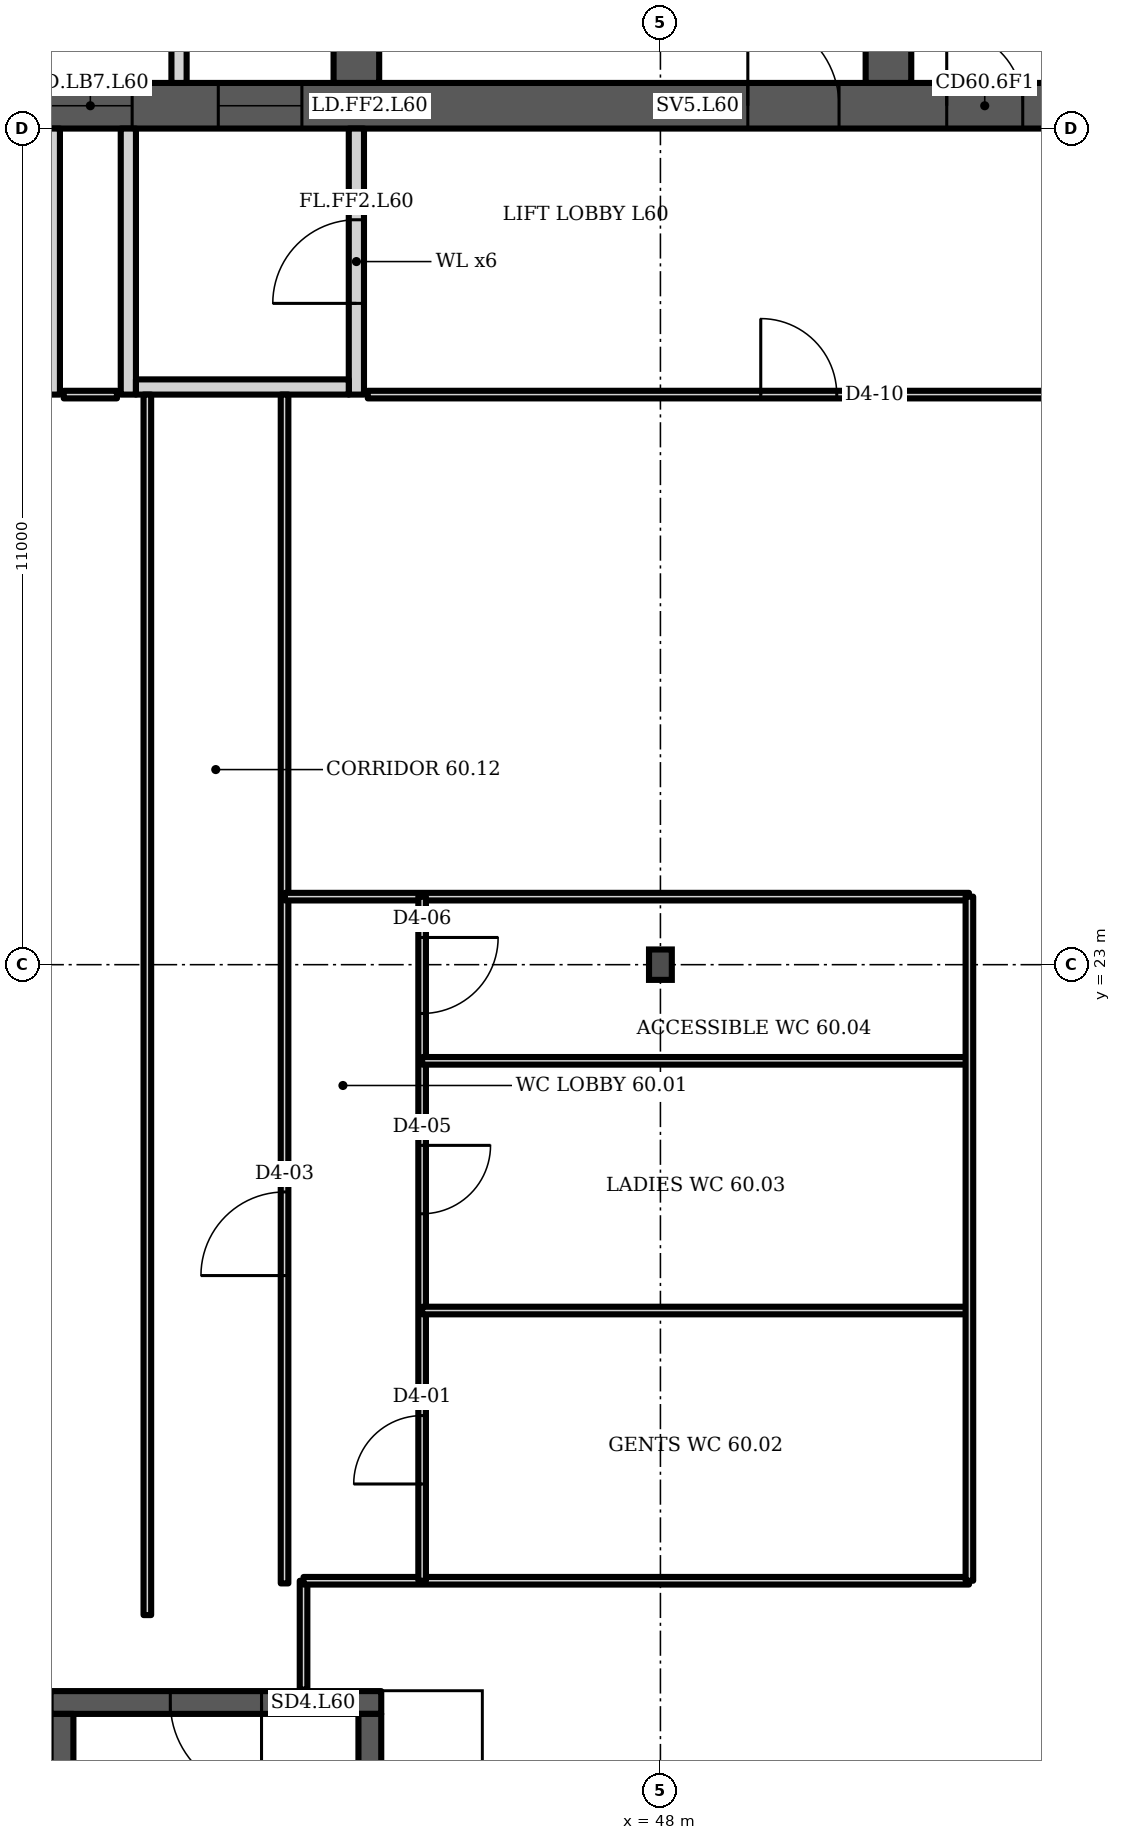
"""IFC4 building model, lengths in metres.
Left out: names, types, materials, properties, quantities, classifications, styles, units other than length and angle.
Written with IfcOpenShell. Run it as: python <this file> out.ifc"""

import sys

from ifc_helpers import new_model, si_unit, direction, frame, frame_2d, origin, origin_2d, place, context, subcontext, project, spatial, polyline, rectangle, i_section, outline, extrude, element, fill, save


model = new_model("IFC4")
c1 = context("Model", 3, precision=1e-05, world=origin(), true_north=direction((0.0, 1.0)))
c2 = subcontext(c1, "Body", "Model", "MODEL_VIEW")
j1 = project(units=[si_unit("LENGTHUNIT", "METRE"), si_unit("PLANEANGLEUNIT", "RADIAN")], contexts=[c1])
p1 = place(None, origin())
s1 = spatial("IfcSite", under=j1, at=p1, CompositionType="ELEMENT")
p2 = place(p1, origin())
s2 = spatial("IfcBuilding", under=s1, at=p2, CompositionType="ELEMENT")
p3 = place(p2, frame((0.0, 0.0, 239.5)))
s3 = spatial("IfcBuildingStorey", under=s2, at=p3, CompositionType="ELEMENT", Elevation=239.5)
p4 = place(p3, frame((23.0, 34.3, 0.0), z_axis=(0.0, 0.0, 1.0), x_axis=(1.0, 0.0, 0.0)))
e1 = element("IfcWall", 1, at=p4, inside=s3, PredefinedType="SHEAR", context=c2, shape_type="SweptSolid", body=[
    extrude(rectangle(XDim=35.0, YDim=0.6, at=frame_2d((17.5, 0.0))), origin(), (0.0, 0.0, 1.0), 3.6),
])
p5 = place(p4, frame((0.65, 0.0, 0.0)))
e2 = element("IfcOpeningElement", 2, at=p5, cuts=e1, PredefinedType="OPENING", context=c2, shape_type="SweptSolid", body=[
    extrude(rectangle(XDim=1.2, YDim=2.1, at=frame_2d((0.6, 1.05))), frame((0.0, 0.31, 0.0), z_axis=(0.0, -1.0, 0.0), x_axis=(1.0, 0.0, 0.0)), (0.0, 0.0, 1.0), 0.62),
])
p6 = place(p4, frame((7.717, 0.0, 0.0)))
e3 = element("IfcOpeningElement", 3, at=p6, cuts=e1, PredefinedType="OPENING", context=c2, shape_type="SweptSolid", body=[
    extrude(rectangle(XDim=1.1, YDim=2.1, at=frame_2d((0.55, 1.05))), frame((0.0, 0.31, 0.0), z_axis=(0.0, -1.0, 0.0), x_axis=(1.0, 0.0, 0.0)), (0.0, 0.0, 1.0), 0.62),
])
p7 = place(p4, frame((12.183, 0.0, 0.0)))
e4 = element("IfcOpeningElement", 4, at=p7, cuts=e1, PredefinedType="OPENING", context=c2, shape_type="SweptSolid", body=[
    extrude(rectangle(XDim=1.1, YDim=2.1, at=frame_2d((0.55, 1.05))), frame((0.0, 0.31, 0.0), z_axis=(0.0, -1.0, 0.0), x_axis=(1.0, 0.0, 0.0)), (0.0, 0.0, 1.0), 0.62),
])
p8 = place(p4, frame((9.8, 0.0, 0.0)))
e5 = element("IfcOpeningElement", 5, at=p8, cuts=e1, PredefinedType="OPENING", context=c2, shape_type="SweptSolid", body=[
    extrude(rectangle(XDim=1.4, YDim=2.1, at=frame_2d((0.7, 1.05))), frame((0.0, 0.31, 0.0), z_axis=(0.0, -1.0, 0.0), x_axis=(1.0, 0.0, 0.0)), (0.0, 0.0, 1.0), 0.62),
])
p9 = place(p4, frame((14.717, 0.0, 0.0)))
e6 = element("IfcOpeningElement", 6, at=p9, cuts=e1, PredefinedType="OPENING", context=c2, shape_type="SweptSolid", body=[
    extrude(rectangle(XDim=1.1, YDim=2.1, at=frame_2d((0.55, 1.05))), frame((0.0, 0.31, 0.0), z_axis=(0.0, -1.0, 0.0), x_axis=(1.0, 0.0, 0.0)), (0.0, 0.0, 1.0), 0.62),
])
p10 = place(p4, frame((16.95, 0.0, 0.0)))
e7 = element("IfcOpeningElement", 7, at=p10, cuts=e1, PredefinedType="OPENING", context=c2, shape_type="SweptSolid", body=[
    extrude(rectangle(XDim=1.1, YDim=2.1, at=frame_2d((0.55, 1.05))), frame((0.0, 0.31, 0.0), z_axis=(0.0, -1.0, 0.0), x_axis=(1.0, 0.0, 0.0)), (0.0, 0.0, 1.0), 0.62),
])
p11 = place(p4, frame((19.183, 0.0, 0.0)))
e8 = element("IfcOpeningElement", 8, at=p11, cuts=e1, PredefinedType="OPENING", context=c2, shape_type="SweptSolid", body=[
    extrude(rectangle(XDim=1.1, YDim=2.1, at=frame_2d((0.55, 1.05))), frame((0.0, 0.31, 0.0), z_axis=(0.0, -1.0, 0.0), x_axis=(1.0, 0.0, 0.0)), (0.0, 0.0, 1.0), 0.62),
])
p12 = place(p4, frame((26.15, 0.0, 0.0)))
e9 = element("IfcOpeningElement", 9, at=p12, cuts=e1, PredefinedType="OPENING", context=c2, shape_type="SweptSolid", body=[
    extrude(rectangle(XDim=1.2, YDim=2.1, at=frame_2d((0.6, 1.05))), frame((0.0, 0.31, 0.0), z_axis=(0.0, -1.0, 0.0), x_axis=(1.0, 0.0, 0.0)), (0.0, 0.0, 1.0), 0.62),
])
p13 = place(p4, frame((28.767, 0.0, 0.0)))
e10 = element("IfcOpeningElement", 10, at=p13, cuts=e1, PredefinedType="OPENING", context=c2, shape_type="SweptSolid", body=[
    extrude(rectangle(XDim=1.0, YDim=2.1, at=frame_2d((0.5, 1.05))), frame((0.0, 0.31, 0.0), z_axis=(0.0, -1.0, 0.0), x_axis=(1.0, 0.0, 0.0)), (0.0, 0.0, 1.0), 0.62),
])
p14 = place(p4, frame((33.083, 0.0, 0.0)))
e11 = element("IfcOpeningElement", 11, at=p14, cuts=e1, PredefinedType="OPENING", context=c2, shape_type="SweptSolid", body=[
    extrude(rectangle(XDim=1.0, YDim=2.1, at=frame_2d((0.5, 1.05))), frame((0.0, 0.31, 0.0), z_axis=(0.0, -1.0, 0.0), x_axis=(1.0, 0.0, 0.0)), (0.0, 0.0, 1.0), 0.62),
])
p15 = place(p4, frame((30.8, 0.0, 0.0)))
e12 = element("IfcOpeningElement", 12, at=p15, cuts=e1, PredefinedType="OPENING", context=c2, shape_type="SweptSolid", body=[
    extrude(rectangle(XDim=1.4, YDim=2.1, at=frame_2d((0.7, 1.05))), frame((0.0, 0.31, 0.0), z_axis=(0.0, -1.0, 0.0), x_axis=(1.0, 0.0, 0.0)), (0.0, 0.0, 1.0), 0.62),
])
p16 = place(p3, frame((44.0, 34.6, 0.0), z_axis=(0.0, 0.0, 1.0), x_axis=(0.0, 1.0, 0.0)))
e13 = element("IfcWall", 13, at=p16, inside=s3, PredefinedType="SHEAR", context=c2, shape_type="SweptSolid", body=[
    extrude(rectangle(XDim=14.784, YDim=0.6, at=frame_2d((7.392, 0.0))), origin(), (0.0, 0.0, 1.0), 3.6),
])
p17 = place(p16, frame((11.608, 0.0, 0.0)))
e14 = element("IfcOpeningElement", 14, at=p17, cuts=e13, PredefinedType="OPENING", context=c2, shape_type="SweptSolid", body=[
    extrude(rectangle(XDim=1.0, YDim=2.1, at=frame_2d((0.5, 1.05))), frame((0.0, 0.31, 0.0), z_axis=(0.0, -1.0, 0.0), x_axis=(1.0, 0.0, 0.0)), (0.0, 0.0, 1.0), 0.62),
])
p18 = place(p16, frame((3.8, 0.0, 0.0)))
e15 = element("IfcOpeningElement", 15, at=p18, cuts=e13, PredefinedType="OPENING", context=c2, shape_type="SweptSolid", body=[
    extrude(rectangle(XDim=1.1, YDim=2.1, at=frame_2d((0.55, 1.05))), frame((0.0, 0.31, 0.0), z_axis=(0.0, -1.0, 0.0), x_axis=(1.0, 0.0, 0.0)), (0.0, 0.0, 1.0), 0.62),
])
p19 = place(p3, frame((51.0, 34.6, 0.0), z_axis=(0.0, 0.0, 1.0), x_axis=(0.0, 1.0, 0.0)))
e16 = element("IfcWall", 16, at=p19, inside=s3, PredefinedType="SHEAR", context=c2, shape_type="SweptSolid", body=[
    extrude(rectangle(XDim=14.171, YDim=0.6, at=frame_2d((7.085, 0.0))), origin(), (0.0, 0.0, 1.0), 3.6),
])
p20 = place(p19, frame((3.8, 0.0, 0.0)))
e17 = element("IfcOpeningElement", 17, at=p20, cuts=e16, PredefinedType="OPENING", context=c2, shape_type="SweptSolid", body=[
    extrude(rectangle(XDim=1.1, YDim=2.1, at=frame_2d((0.55, 1.05))), frame((0.0, 0.31, 0.0), z_axis=(0.0, -1.0, 0.0), x_axis=(1.0, 0.0, 0.0)), (0.0, 0.0, 1.0), 0.62),
])
p21 = place(p3, frame((48.0, 23.0, 0.0), z_axis=(0.0, 0.0, 1.0), x_axis=(1.0, 0.0, 0.0)))
e18 = element("IfcColumn", 18, at=p21, inside=s3, PredefinedType="COLUMN", context=c2, shape_type="SweptSolid", body=[
    extrude(i_section(OverallWidth=0.3, OverallDepth=0.4, WebThickness=0.013, FlangeThickness=0.024, FilletRadius=0.027, at=origin_2d()), origin(), (0.0, 0.0, 1.0), 3.6),
])
p22 = place(p3, frame((0.0, 0.0, -0.0)))
e19 = element("IfcWall", 19, at=p22, inside=s3, PredefinedType="PARTITIONING", context=c2, shape_type="SweptSolid", body=[
    extrude(outline(polyline([(41.567, 37.1), (39.433, 37.1), (39.433, 34.6), (39.233, 34.6), (39.233, 37.45), (37.3, 37.45), (37.3, 37.65), (39.233, 37.65), (39.433, 37.65), (39.433, 37.3), (41.567, 37.3), (41.567, 37.35), (41.767, 37.35), (43.7, 37.35), (43.7, 37.15), (41.767, 37.15), (41.767, 34.6), (41.567, 34.6), (41.567, 37.1)])), origin(), (0.0, 0.0, 1.0), 3.2),
])
for number, where, z_axis, x_axis in (
    (20, (40.0, 30.5, 0.0), (0.0, 0.0, 1.0), (0.0, 1.0, 0.0)),
    (21, (41.0, 30.5, 0.0), (0.0, 0.0, 1.0), (0.0, 1.0, 0.0)),
):
    element("IfcWall", number, at=place(p3, frame(where, z_axis=z_axis, x_axis=x_axis)), inside=s3, PredefinedType="PARTITIONING", context=c2, shape_type="SweptSolid", body=[
        extrude(rectangle(XDim=3.5, YDim=0.2, at=frame_2d((1.75, 0.0))), origin(), (0.0, 0.0, 1.0), 3.2),
    ])
p23 = place(p3, frame((44.0, 30.5, 0.0), z_axis=(0.0, 0.0, 1.0), x_axis=(0.0, 1.0, 0.0)))
e22 = element("IfcWall", 22, at=p23, inside=s3, PredefinedType="PARTITIONING", context=c2, shape_type="SweptSolid", body=[
    extrude(rectangle(XDim=3.5, YDim=0.2, at=frame_2d((1.75, 0.0))), origin(), (0.0, 0.0, 1.0), 3.2),
])
p24 = place(p23, frame((1.2, 0.0, 0.0)))
e23 = element("IfcOpeningElement", 23, at=p24, cuts=e22, PredefinedType="OPENING", context=c2, shape_type="SweptSolid", body=[
    extrude(rectangle(XDim=1.1, YDim=2.1, at=frame_2d((0.55, 1.05))), frame((0.0, 0.11, 0.0), z_axis=(0.0, -1.0, 0.0), x_axis=(1.0, 0.0, 0.0)), (0.0, 0.0, 1.0), 0.22),
])
p25 = place(p3, frame((41.1, 30.6, 0.0), z_axis=(0.0, 0.0, 1.0), x_axis=(1.0, 0.0, 0.0)))
e24 = element("IfcWall", 24, at=p25, inside=s3, PredefinedType="PARTITIONING", context=c2, shape_type="SweptSolid", body=[
    extrude(rectangle(XDim=2.8, YDim=0.2, at=frame_2d((1.4, 0.0))), origin(), (0.0, 0.0, 1.0), 3.2),
])
p26 = place(p3, frame((39.977, 13.293, 0.0), z_axis=(0.0, 0.0, 1.0), x_axis=(1.0, 0.0, 0.0)))
e25 = element("IfcWall", 25, at=p26, inside=s3, PredefinedType="SHEAR", context=c2, shape_type="SweptSolid", body=[
    extrude(rectangle(XDim=4.35, YDim=0.3, at=frame_2d((2.175, 0.0))), origin(), (0.0, 0.0, 1.0), 3.2),
])
p27 = place(p26, frame((1.575, 0.0, 0.0)))
e26 = element("IfcOpeningElement", 26, at=p27, cuts=e25, PredefinedType="OPENING", context=c2, shape_type="SweptSolid", body=[
    extrude(rectangle(XDim=1.2, YDim=2.1, at=frame_2d((0.6, 1.05))), frame((0.0, 0.16, 0.0), z_axis=(0.0, -1.0, 0.0), x_axis=(1.0, 0.0, 0.0)), (0.0, 0.0, 1.0), 0.32),
])
p28 = place(p3, frame((41.25, 14.443, 0.0), z_axis=(0.0, 0.0, 1.0), x_axis=(0.0, 1.0, 0.0)))
e27 = element("IfcWall", 27, at=p28, inside=s3, PredefinedType="PARTITIONING", context=c2, shape_type="SweptSolid", body=[
    extrude(rectangle(XDim=16.057, YDim=0.1, at=frame_2d((8.028, 0.0))), origin(), (0.0, 0.0, 1.0), 3.2),
])
p29 = place(p3, frame((43.055, 14.86, 0.0), z_axis=(0.0, 0.0, 1.0), x_axis=(0.0, 1.0, 0.0)))
e28 = element("IfcWall", 28, at=p29, inside=s3, PredefinedType="PARTITIONING", context=c2, shape_type="SweptSolid", body=[
    extrude(rectangle(XDim=15.64, YDim=0.1, at=frame_2d((7.82, 0.0))), origin(), (0.0, 0.0, 1.0), 3.2),
])
p30 = place(p29, frame((4.05, 0.0, 0.0)))
e29 = element("IfcOpeningElement", 29, at=p30, cuts=e28, PredefinedType="OPENING", context=c2, shape_type="SweptSolid", body=[
    extrude(rectangle(XDim=1.1, YDim=2.1, at=frame_2d((0.55, 1.05))), frame((0.0, 0.06, 0.0), z_axis=(0.0, -1.0, 0.0), x_axis=(1.0, 0.0, 0.0)), (0.0, 0.0, 1.0), 0.12),
])
p31 = place(p3, frame((44.15, 30.5, 0.0), z_axis=(0.0, 0.0, 1.0), x_axis=(1.0, 0.0, 0.0)))
e30 = element("IfcWall", 30, at=p31, inside=s3, PredefinedType="PARTITIONING", context=c2, shape_type="SweptSolid", body=[
    extrude(rectangle(XDim=12.95, YDim=0.1, at=frame_2d((6.475, 0.0))), origin(), (0.0, 0.0, 1.0), 3.2),
])
p32 = place(p31, frame((5.17, 0.0, 0.0)))
e31 = element("IfcOpeningElement", 31, at=p32, cuts=e30, PredefinedType="OPENING", context=c2, shape_type="SweptSolid", body=[
    extrude(rectangle(XDim=1.0, YDim=2.1, at=frame_2d((0.5, 1.05))), frame((0.0, 0.06, 0.0), z_axis=(0.0, -1.0, 0.0), x_axis=(1.0, 0.0, 0.0)), (0.0, 0.0, 1.0), 0.12),
])
p33 = place(p3, frame((43.06, 23.895, 0.0), z_axis=(0.0, 0.0, 1.0), x_axis=(1.0, 0.0, 0.0)))
e32 = element("IfcWall", 32, at=p33, inside=s3, PredefinedType="PARTITIONING", context=c2, shape_type="SweptSolid", body=[
    extrude(rectangle(XDim=9.0, YDim=0.1, at=frame_2d((4.5, 0.0))), origin(), (0.0, 0.0, 1.0), 3.2),
])
p34 = place(p3, frame((43.305, 13.463, 0.0), z_axis=(0.0, 0.0, 1.0), x_axis=(0.0, 1.0, 0.0)))
e33 = element("IfcWall", 33, at=p34, inside=s3, PredefinedType="PARTITIONING", context=c2, shape_type="SweptSolid", body=[
    extrude(rectangle(XDim=1.432, YDim=0.1, at=frame_2d((0.716, 0.0))), origin(), (0.0, 0.0, 1.0), 3.2),
])
p35 = place(p3, frame((43.305, 14.895, 0.0), z_axis=(0.0, 0.0, 1.0), x_axis=(1.0, 0.0, 0.0)))
e34 = element("IfcWall", 34, at=p35, inside=s3, PredefinedType="PARTITIONING", context=c2, shape_type="SweptSolid", body=[
    extrude(rectangle(XDim=8.755, YDim=0.1, at=frame_2d((4.377, 0.0))), origin(), (0.0, 0.0, 1.0), 3.2),
])
p36 = place(p3, frame((44.865, 14.895, 0.0), z_axis=(0.0, 0.0, 1.0), x_axis=(0.0, 1.0, 0.0)))
e35 = element("IfcWall", 35, at=p36, inside=s3, PredefinedType="PARTITIONING", context=c2, shape_type="SweptSolid", body=[
    extrude(rectangle(XDim=9.0, YDim=0.1, at=frame_2d((4.5, 0.0))), origin(), (0.0, 0.0, 1.0), 3.2),
])
p37 = place(p36, frame((1.273, 0.0, 0.0)))
e36 = element("IfcOpeningElement", 36, at=p37, cuts=e35, PredefinedType="OPENING", context=c2, shape_type="SweptSolid", body=[
    extrude(rectangle(XDim=0.9, YDim=2.1, at=frame_2d((0.45, 1.05))), frame((0.0, 0.06, 0.0), z_axis=(0.0, -1.0, 0.0), x_axis=(1.0, 0.0, 0.0)), (0.0, 0.0, 1.0), 0.12),
])
p38 = place(p36, frame((4.828, 0.0, 0.0)))
e37 = element("IfcOpeningElement", 37, at=p38, cuts=e35, PredefinedType="OPENING", context=c2, shape_type="SweptSolid", body=[
    extrude(rectangle(XDim=0.9, YDim=2.1, at=frame_2d((0.45, 1.05))), frame((0.0, 0.06, 0.0), z_axis=(0.0, -1.0, 0.0), x_axis=(1.0, 0.0, 0.0)), (0.0, 0.0, 1.0), 0.12),
])
p39 = place(p36, frame((7.463, 0.0, 0.0)))
e38 = element("IfcOpeningElement", 38, at=p39, cuts=e35, PredefinedType="OPENING", context=c2, shape_type="SweptSolid", body=[
    extrude(rectangle(XDim=1.0, YDim=2.1, at=frame_2d((0.5, 1.05))), frame((0.0, 0.06, 0.0), z_axis=(0.0, -1.0, 0.0), x_axis=(1.0, 0.0, 0.0)), (0.0, 0.0, 1.0), 0.12),
])
for number, where, z_axis, x_axis in (
    (39, (44.865, 18.45, 0.0), (0.0, 0.0, 1.0), (1.0, 0.0, 0.0)),
    (40, (44.865, 21.735, 0.0), (0.0, 0.0, 1.0), (1.0, 0.0, 0.0)),
):
    element("IfcWall", number, at=place(p3, frame(where, z_axis=z_axis, x_axis=x_axis)), inside=s3, PredefinedType="PARTITIONING", context=c2, shape_type="SweptSolid", body=[
        extrude(rectangle(XDim=7.195, YDim=0.1, at=frame_2d((3.598, 0.0))), origin(), (0.0, 0.0, 1.0), 3.2),
    ])
p40 = place(p3, frame((52.065, 14.895, 0.0), z_axis=(0.0, 0.0, 1.0), x_axis=(0.0, 1.0, 0.0)))
e41 = element("IfcWall", 41, at=p40, inside=s3, PredefinedType="PARTITIONING", context=c2, shape_type="SweptSolid", body=[
    extrude(rectangle(XDim=9.0, YDim=0.1, at=frame_2d((4.5, 0.0))), origin(), (0.0, 0.0, 1.0), 3.2),
])
p41 = place(p3, frame((40.15, 30.5, 0.0), z_axis=(0.0, 0.0, 1.0), x_axis=(1.0, 0.0, 0.0)))
e42 = element("IfcWall", 42, at=p41, inside=s3, PredefinedType="PARTITIONING", context=c2, shape_type="SweptSolid", body=[
    extrude(rectangle(XDim=0.7, YDim=0.1, at=frame_2d((0.35, 0.0))), origin(), (0.0, 0.0, 1.0), 3.2),
])
for number, where, z_axis, x_axis in (
    (43, (40.127, 5.643, 0.0), (0.0, 0.0, 1.0), (0.0, 1.0, 0.0)),
    (44, (44.177, 5.643, 0.0), (0.0, 0.0, 1.0), (0.0, 1.0, 0.0)),
):
    element("IfcWall", number, at=place(p3, frame(where, z_axis=z_axis, x_axis=x_axis)), inside=s3, PredefinedType="SHEAR", context=c2, shape_type="SweptSolid", body=[
        extrude(rectangle(XDim=7.5, YDim=0.3, at=frame_2d((3.75, 0.0))), origin(), (0.0, 0.0, 1.0), 3.2),
    ])
p42 = place(p10, origin())
e45 = element("IfcDoor", 45, at=p42, inside=s3, OperationType="DOUBLE_DOOR_SLIDING", PredefinedType="DOOR", context=c2, shape_type="SweptSolid", body=[
    extrude(rectangle(XDim=1.1, YDim=2.1, at=frame_2d((0.55, 1.05))), frame((0.0, 0.025, 0.0), z_axis=(0.0, -1.0, 0.0), x_axis=(1.0, 0.0, 0.0)), (0.0, 0.0, 1.0), 0.05),
])
fill(e7, e45)
p43 = place(p11, origin())
e46 = element("IfcDoor", 46, at=p43, inside=s3, OperationType="DOUBLE_DOOR_SLIDING", PredefinedType="DOOR", context=c2, shape_type="SweptSolid", body=[
    extrude(rectangle(XDim=1.1, YDim=2.1, at=frame_2d((0.55, 1.05))), frame((0.0, 0.025, 0.0), z_axis=(0.0, -1.0, 0.0), x_axis=(1.0, 0.0, 0.0)), (0.0, 0.0, 1.0), 0.05),
])
fill(e8, e46)
p44 = place(p12, origin())
e47 = element("IfcDoor", 47, at=p44, inside=s3, OperationType="SINGLE_SWING_LEFT", PredefinedType="DOOR", context=c2, shape_type="SweptSolid", body=[
    extrude(rectangle(XDim=1.2, YDim=2.1, at=frame_2d((0.6, 1.05))), frame((0.0, 0.025, 0.0), z_axis=(0.0, -1.0, 0.0), x_axis=(1.0, 0.0, 0.0)), (0.0, 0.0, 1.0), 0.05),
])
fill(e9, e47)
p45 = place(p13, origin())
e48 = element("IfcDoor", 48, at=p45, inside=s3, OperationType="SINGLE_SWING_LEFT", PredefinedType="DOOR", context=c2, shape_type="SweptSolid", body=[
    extrude(rectangle(XDim=1.0, YDim=2.1, at=frame_2d((0.5, 1.05))), frame((0.0, 0.025, 0.0), z_axis=(0.0, -1.0, 0.0), x_axis=(1.0, 0.0, 0.0)), (0.0, 0.0, 1.0), 0.05),
])
fill(e10, e48)
p46 = place(p24, origin())
e49 = element("IfcDoor", 49, at=p46, inside=s3, OperationType="SINGLE_SWING_LEFT", PredefinedType="DOOR", context=c2, shape_type="SweptSolid", body=[
    extrude(rectangle(XDim=1.1, YDim=2.1, at=frame_2d((0.55, 1.05))), frame((0.0, 0.025, 0.0), z_axis=(0.0, -1.0, 0.0), x_axis=(1.0, 0.0, 0.0)), (0.0, 0.0, 1.0), 0.05),
])
fill(e23, e49)
p47 = place(p27, origin())
e50 = element("IfcDoor", 50, at=p47, inside=s3, OperationType="SINGLE_SWING_RIGHT", PredefinedType="DOOR", context=c2, shape_type="SweptSolid", body=[
    extrude(rectangle(XDim=1.2, YDim=2.1, at=frame_2d((0.6, 1.05))), frame((0.0, 0.025, 0.0), z_axis=(0.0, -1.0, 0.0), x_axis=(1.0, 0.0, 0.0)), (0.0, 0.0, 1.0), 0.05),
])
fill(e26, e50)
p48 = place(p37, origin())
e51 = element("IfcDoor", 51, at=p48, inside=s3, OperationType="SINGLE_SWING_LEFT", PredefinedType="DOOR", context=c2, shape_type="SweptSolid", body=[
    extrude(rectangle(XDim=0.9, YDim=2.1, at=frame_2d((0.45, 1.05))), frame((0.0, 0.025, 0.0), z_axis=(0.0, -1.0, 0.0), x_axis=(1.0, 0.0, 0.0)), (0.0, 0.0, 1.0), 0.05),
])
fill(e36, e51)
p49 = place(p30, origin())
e52 = element("IfcDoor", 52, at=p49, inside=s3, OperationType="SINGLE_SWING_LEFT", PredefinedType="DOOR", context=c2, shape_type="SweptSolid", body=[
    extrude(rectangle(XDim=1.1, YDim=2.1, at=frame_2d((0.55, 1.05))), frame((0.0, 0.025, 0.0), z_axis=(0.0, -1.0, 0.0), x_axis=(1.0, 0.0, 0.0)), (0.0, 0.0, 1.0), 0.05),
])
fill(e29, e52)
p50 = place(p38, origin())
e53 = element("IfcDoor", 53, at=p50, inside=s3, OperationType="SINGLE_SWING_RIGHT", PredefinedType="DOOR", context=c2, shape_type="SweptSolid", body=[
    extrude(rectangle(XDim=0.9, YDim=2.1, at=frame_2d((0.45, 1.05))), frame((0.0, 0.025, 0.0), z_axis=(0.0, -1.0, 0.0), x_axis=(1.0, 0.0, 0.0)), (0.0, 0.0, 1.0), 0.05),
])
fill(e37, e53)
p51 = place(p39, origin())
e54 = element("IfcDoor", 54, at=p51, inside=s3, OperationType="SINGLE_SWING_RIGHT", PredefinedType="DOOR", context=c2, shape_type="SweptSolid", body=[
    extrude(rectangle(XDim=1.0, YDim=2.1, at=frame_2d((0.5, 1.05))), frame((0.0, 0.025, 0.0), z_axis=(0.0, -1.0, 0.0), x_axis=(1.0, 0.0, 0.0)), (0.0, 0.0, 1.0), 0.05),
])
fill(e38, e54)
p52 = place(p32, origin())
e55 = element("IfcDoor", 55, at=p52, inside=s3, OperationType="SINGLE_SWING_LEFT", PredefinedType="DOOR", context=c2, shape_type="SweptSolid", body=[
    extrude(rectangle(XDim=1.0, YDim=2.1, at=frame_2d((0.5, 1.05))), frame((0.0, 0.025, 0.0), z_axis=(0.0, -1.0, 0.0), x_axis=(1.0, 0.0, 0.0)), (0.0, 0.0, 1.0), 0.05),
])
fill(e31, e55)
save(model, sys.argv[1])
